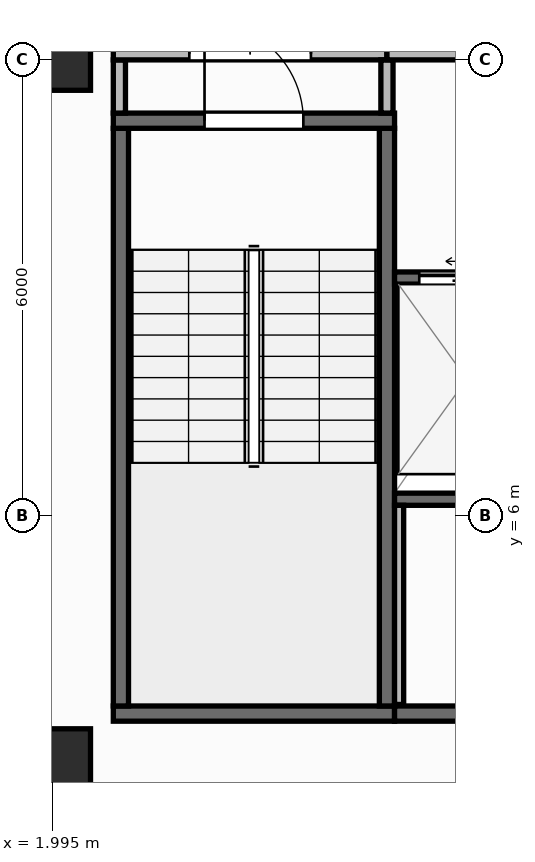
"""IFC4 building model, lengths in metres.
Left out: names, types, materials, properties, quantities, classifications, styles, units other than length and angle.
Written with IfcOpenShell. Run it as: python <this file> out.ifc"""

import sys

from ifc_helpers import new_model, si_unit, direction, frame, frame_2d, origin, origin_2d, place, context, subcontext, project, spatial, rectangle, extrude, element, fill, save


model = new_model("IFC4")
c1 = context("Model", 3, precision=1e-05, world=origin(), true_north=direction((0.0, 1.0)))
c2 = subcontext(c1, "Body", "Model", "MODEL_VIEW")
j1 = project(units=[si_unit("LENGTHUNIT", "METRE"), si_unit("PLANEANGLEUNIT", "RADIAN")], contexts=[c1])
p1 = place(None, origin())
s1 = spatial("IfcSite", under=j1, at=p1, CompositionType="ELEMENT")
p2 = place(p1, origin())
s2 = spatial("IfcBuilding", under=s1, at=p2, CompositionType="ELEMENT")
p3 = place(p2, frame((0.0, 0.0, 284.2)))
s3 = spatial("IfcBuildingStorey", under=s2, at=p3, CompositionType="ELEMENT", Elevation=284.2)
for number, where, z_axis, x_axis in (
    (1, (2.1, 2.8, 0.0), (0.0, 0.0, 1.0), (1.0, 0.0, 0.0)),
    (2, (2.1, 12.0, 0.0), (0.0, 0.0, 1.0), (1.0, 0.0, 0.0)),
):
    element("IfcColumn", number, at=place(p3, frame(where, z_axis=z_axis, x_axis=x_axis)), inside=s3, PredefinedType="COLUMN", context=c2, shape_type="SweptSolid", body=[
        extrude(rectangle(XDim=0.8, YDim=0.8, at=origin_2d()), origin(), (0.0, 0.0, 1.0), 3.95),
    ])
p4 = place(p3, frame((2.46, 0.172, 0.0), z_axis=(0.0, 0.0, 1.0), x_axis=(0.997289775118, 0.073573802713, 0.0)))
e3 = element("IfcWall", 3, at=p4, inside=s3, PredefinedType="STANDARD", context=c2, shape_type="SweptSolid", body=[
    extrude(rectangle(XDim=36.379, YDim=0.26, at=frame_2d((18.189, 0.0))), origin(), (0.0, 0.0, 1.0), 3.71),
])
p5 = place(p4, frame((16.989, 0.0, 0.9)))
e4 = element("IfcOpeningElement", 4, at=p5, cuts=e3, PredefinedType="OPENING", context=c2, shape_type="SweptSolid", body=[
    extrude(rectangle(XDim=2.4, YDim=1.65, at=frame_2d((1.2, 0.825))), frame((0.0, 0.14, 0.0), z_axis=(0.0, -1.0, 0.0), x_axis=(1.0, 0.0, 0.0)), (0.0, 0.0, 1.0), 0.28),
])
p6 = place(p3, frame((2.8, 3.4, 0.0), z_axis=(0.0, 0.0, 1.0), x_axis=(1.0, 0.0, 0.0)))
e5 = element("IfcWall", 5, at=p6, inside=s3, PredefinedType="SHEAR", context=c2, shape_type="SweptSolid", body=[
    extrude(rectangle(XDim=3.7, YDim=0.2, at=frame_2d((1.85, 0.0))), origin(), (0.0, 0.0, 1.0), 3.71),
])
for number, where, z_axis, x_axis in (
    (6, (2.9, 3.5, 0.0), (0.0, 0.0, 1.0), (0.0, 1.0, 0.0)),
    (7, (6.4, 3.5, 0.0), (0.0, 0.0, 1.0), (0.0, 1.0, 0.0)),
):
    element("IfcWall", number, at=place(p3, frame(where, z_axis=z_axis, x_axis=x_axis)), inside=s3, PredefinedType="SHEAR", context=c2, shape_type="SweptSolid", body=[
        extrude(rectangle(XDim=7.6, YDim=0.2, at=frame_2d((3.8, 0.0))), origin(), (0.0, 0.0, 1.0), 3.71),
    ])
p7 = place(p3, frame((2.8, 11.2, 0.0), z_axis=(0.0, 0.0, 1.0), x_axis=(1.0, 0.0, 0.0)))
e8 = element("IfcWall", 8, at=p7, inside=s3, PredefinedType="SHEAR", context=c2, shape_type="SweptSolid", body=[
    extrude(rectangle(XDim=3.7, YDim=0.2, at=frame_2d((1.85, 0.0))), origin(), (0.0, 0.0, 1.0), 3.71),
])
p8 = place(p7, frame((1.2, 0.0, 0.0)))
e9 = element("IfcOpeningElement", 9, at=p8, cuts=e8, PredefinedType="OPENING", context=c2, shape_type="SweptSolid", body=[
    extrude(rectangle(XDim=1.3, YDim=2.15, at=frame_2d((0.65, 1.075))), frame((0.0, 0.11, 0.0), z_axis=(0.0, -1.0, 0.0), x_axis=(1.0, 0.0, 0.0)), (0.0, 0.0, 1.0), 0.22),
])
p9 = place(p3, frame((6.5, 3.4, 0.0), z_axis=(0.0, 0.0, 1.0), x_axis=(1.0, 0.0, 0.0)))
e10 = element("IfcWall", 10, at=p9, inside=s3, PredefinedType="SHEAR", context=c2, shape_type="SweptSolid", body=[
    extrude(rectangle(XDim=13.7, YDim=0.2, at=frame_2d((6.85, 0.0))), origin(), (0.0, 0.0, 1.0), 3.71),
])
p10 = place(p3, frame((6.5, 6.22, 0.0), z_axis=(0.0, 0.0, 1.0), x_axis=(1.0, 0.0, 0.0)))
e11 = element("IfcWall", 11, at=p10, inside=s3, PredefinedType="SHEAR", context=c2, shape_type="SweptSolid", body=[
    extrude(rectangle(XDim=12.11, YDim=0.16, at=frame_2d((6.055, 0.0))), origin(), (0.0, 0.0, 1.0), 3.71),
])
p11 = place(p3, frame((6.5, 9.13, 0.0), z_axis=(0.0, 0.0, 1.0), x_axis=(1.0, 0.0, 0.0)))
e12 = element("IfcWall", 12, at=p11, inside=s3, PredefinedType="SHEAR", context=c2, shape_type="SweptSolid", body=[
    extrude(rectangle(XDim=1.975, YDim=0.16, at=frame_2d((0.988, 0.0))), origin(), (0.0, 0.0, 1.0), 3.71),
])
p12 = place(p11, frame((0.325, 0.0, 0.0)))
e13 = element("IfcOpeningElement", 13, at=p12, cuts=e12, PredefinedType="OPENING", context=c2, shape_type="SweptSolid", body=[
    extrude(rectangle(XDim=1.25, YDim=2.15, at=frame_2d((0.625, 1.075))), frame((0.0, 0.09, 0.0), z_axis=(0.0, -1.0, 0.0), x_axis=(1.0, 0.0, 0.0)), (0.0, 0.0, 1.0), 0.18),
])
p13 = place(p3, frame((6.56, 3.52, 0.0), z_axis=(0.0, 0.0, 1.0), x_axis=(0.0, 1.0, 0.0)))
e14 = element("IfcWall", 14, at=p13, inside=s3, PredefinedType="PARTITIONING", context=c2, shape_type="SweptSolid", body=[
    extrude(rectangle(XDim=2.62, YDim=0.12, at=frame_2d((1.31, 0.0))), origin(), (0.0, 0.0, 1.0), 3.71),
])
p14 = place(p3, frame((2.88, 11.3, 0.0), z_axis=(0.0, 0.0, 1.0), x_axis=(0.0, 1.0, 0.0)))
e15 = element("IfcWall", 15, at=p14, inside=s3, PredefinedType="PARTITIONING", context=c2, shape_type="SweptSolid", body=[
    extrude(rectangle(XDim=0.7, YDim=0.16, at=frame_2d((0.35, 0.0))), origin(), (0.0, 0.0, 1.0), 3.71),
])
p15 = place(p3, frame((2.8, 12.08, 0.0), z_axis=(0.0, 0.0, 1.0), x_axis=(1.0, 0.0, 0.0)))
e16 = element("IfcWall", 16, at=p15, inside=s3, PredefinedType="PARTITIONING", context=c2, shape_type="SweptSolid", body=[
    extrude(rectangle(XDim=3.6, YDim=0.16, at=frame_2d((1.8, 0.0))), origin(), (0.0, 0.0, 1.0), 3.157),
])
p16 = place(p15, frame((1.0, 0.0, 0.0)))
e17 = element("IfcOpeningElement", 17, at=p16, cuts=e16, PredefinedType="OPENING", context=c2, shape_type="SweptSolid", body=[
    extrude(rectangle(XDim=1.6, YDim=2.05, at=frame_2d((0.8, 1.025))), frame((0.0, 0.09, 0.0), z_axis=(0.0, -1.0, 0.0), x_axis=(1.0, 0.0, 0.0)), (0.0, 0.0, 1.0), 0.18),
])
p17 = place(p3, frame((6.4, 11.3, 0.0), z_axis=(0.0, 0.0, 1.0), x_axis=(0.0, 1.0, 0.0)))
e18 = element("IfcWall", 18, at=p17, inside=s3, PredefinedType="PARTITIONING", context=c2, shape_type="SweptSolid", body=[
    extrude(rectangle(XDim=0.7, YDim=0.16, at=frame_2d((0.35, 0.0))), origin(), (0.0, 0.0, 1.0), 3.71),
])
p18 = place(p3, frame((6.4, 12.08, 0.0), z_axis=(0.0, 0.0, 1.0), x_axis=(1.0, 0.0, 0.0)))
e19 = element("IfcWall", 19, at=p18, inside=s3, PredefinedType="PARTITIONING", context=c2, shape_type="SweptSolid", body=[
    extrude(rectangle(XDim=6.18, YDim=0.16, at=frame_2d((3.09, 0.0))), origin(), (0.0, 0.0, 1.0), 3.157),
])
p19 = place(p18, frame((2.29, 0.0, 0.0)))
e20 = element("IfcOpeningElement", 20, at=p19, cuts=e19, PredefinedType="OPENING", context=c2, shape_type="SweptSolid", body=[
    extrude(rectangle(XDim=1.6, YDim=2.05, at=frame_2d((0.8, 1.025))), frame((0.0, 0.09, 0.0), z_axis=(0.0, -1.0, 0.0), x_axis=(1.0, 0.0, 0.0)), (0.0, 0.0, 1.0), 0.18),
])
p20 = place(p8, origin())
e21 = element("IfcDoor", 21, at=p20, inside=s3, OperationType="SINGLE_SWING_LEFT", PredefinedType="DOOR", context=c2, shape_type="SweptSolid", body=[
    extrude(rectangle(XDim=1.3, YDim=2.15, at=frame_2d((0.65, 1.075))), frame((0.0, 0.025, 0.0), z_axis=(0.0, -1.0, 0.0), x_axis=(1.0, 0.0, 0.0)), (0.0, 0.0, 1.0), 0.05),
])
fill(e9, e21)
p21 = place(p12, origin())
e22 = element("IfcDoor", 22, at=p21, inside=s3, OperationType="SLIDING_TO_LEFT", PredefinedType="DOOR", context=c2, shape_type="SweptSolid", body=[
    extrude(rectangle(XDim=1.25, YDim=2.15, at=frame_2d((0.625, 1.075))), frame((0.0, 0.025, 0.0), z_axis=(0.0, -1.0, 0.0), x_axis=(1.0, 0.0, 0.0)), (0.0, 0.0, 1.0), 0.05),
])
fill(e13, e22)
p22 = place(p16, origin())
e23 = element("IfcDoor", 23, at=p22, inside=s3, OperationType="DOUBLE_DOOR_SINGLE_SWING", PredefinedType="DOOR", context=c2, shape_type="SweptSolid", body=[
    extrude(rectangle(XDim=1.6, YDim=2.05, at=frame_2d((0.8, 1.025))), frame((0.0, 0.025, 0.0), z_axis=(0.0, -1.0, 0.0), x_axis=(1.0, 0.0, 0.0)), (0.0, 0.0, 1.0), 0.05),
])
fill(e17, e23)
save(model, sys.argv[1])
